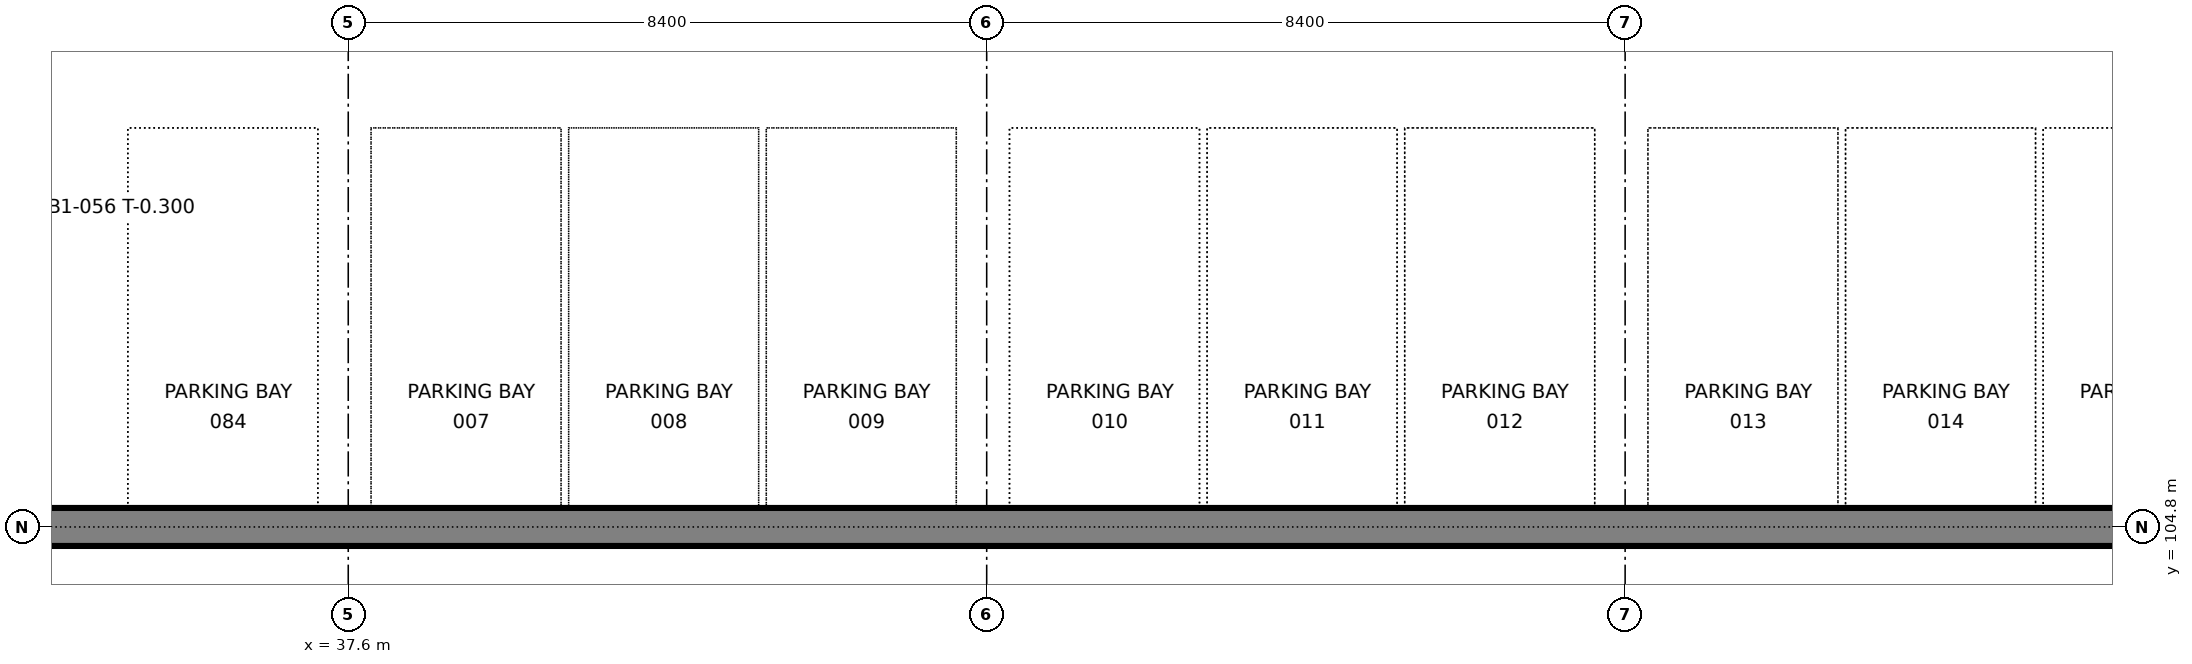
"""IFC4 building model, lengths in metres.
Left out: names, types, materials, properties, quantities, classifications, styles, units other than length and angle.
Written with IfcOpenShell. Run it as: python <this file> out.ifc"""

import sys

from ifc_helpers import new_model, si_unit, direction, frame, frame_2d, origin, place, context, subcontext, project, spatial, rectangle, extrude, element, save


model = new_model("IFC4")
c1 = context("Model", 3, precision=1e-05, world=origin(), true_north=direction((0.0, 1.0)))
c2 = subcontext(c1, "Body", "Model", "MODEL_VIEW")
j1 = project(units=[si_unit("LENGTHUNIT", "METRE"), si_unit("PLANEANGLEUNIT", "RADIAN")], contexts=[c1])
p1 = place(None, origin())
s1 = spatial("IfcSite", under=j1, at=p1, CompositionType="ELEMENT")
p2 = place(p1, origin())
s2 = spatial("IfcBuilding", under=s1, at=p2, CompositionType="ELEMENT")
p3 = place(p2, frame((0.0, 0.0, -4.6)))
s3 = spatial("IfcBuildingStorey", under=s2, at=p3, CompositionType="ELEMENT", Elevation=-4.6)
p4 = place(p3, frame((4.25, 104.8, 0.0), z_axis=(0.0, 0.0, 1.0), x_axis=(1.0, 0.0, 0.0)))
e1 = element("IfcWall", 1, at=p4, inside=s3, PredefinedType="SOLIDWALL", context=c2, shape_type="SweptSolid", body=[
    extrude(rectangle(XDim=117.1, YDim=0.5, at=frame_2d((58.55, 0.0))), origin(), (0.0, 0.0, 1.0), 4.3),
])
save(model, sys.argv[1])
